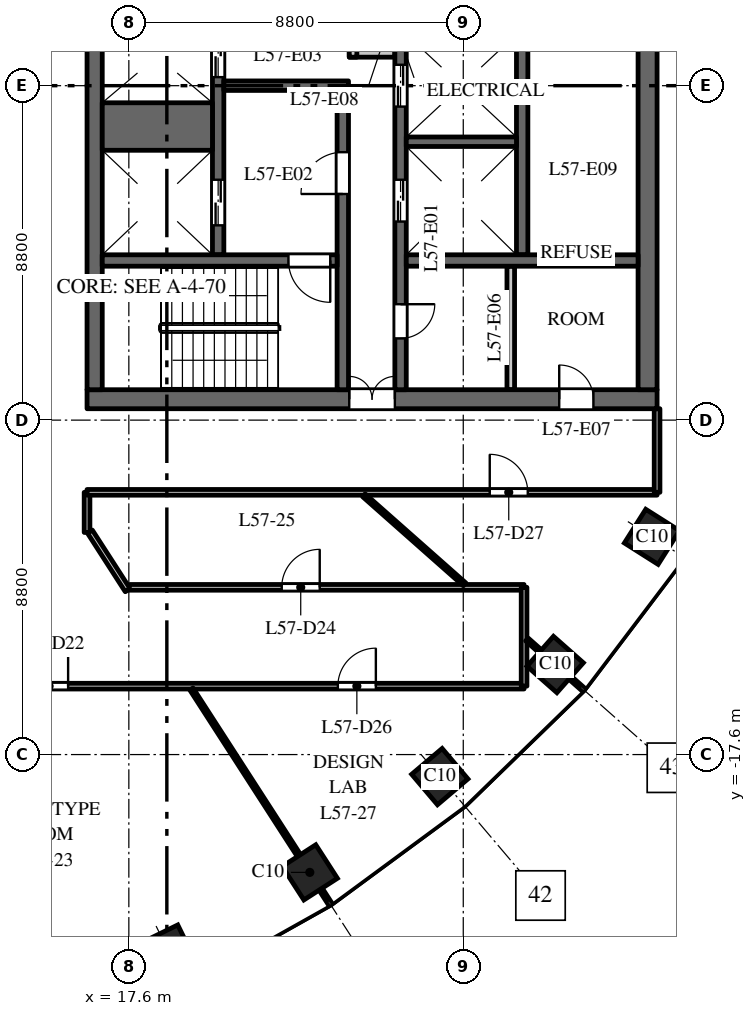
"""IFC4 building model, lengths in metres.
Left out: names, types, materials, properties, quantities, classifications, styles, units other than length and angle.
Written with IfcOpenShell. Run it as: python <this file> out.ifc"""

import sys

from ifc_helpers import new_model, si_unit, direction, frame, frame_2d, origin, origin_2d, place, context, subcontext, project, spatial, rectangle, extrude, element, fill, save


model = new_model("IFC4")
c1 = context("Model", 3, precision=1e-05, world=origin(), true_north=direction((0.0, 1.0)))
c2 = subcontext(c1, "Body", "Model", "MODEL_VIEW")
j1 = project(units=[si_unit("LENGTHUNIT", "METRE"), si_unit("PLANEANGLEUNIT", "RADIAN")], contexts=[c1])
p1 = place(None, origin())
s1 = spatial("IfcSite", under=j1, at=p1, CompositionType="ELEMENT")
p2 = place(p1, origin())
s2 = spatial("IfcBuilding", under=s1, at=p2, CompositionType="ELEMENT")
p3 = place(p2, frame((0.0, 0.0, 269.5)))
s3 = spatial("IfcBuildingStorey", under=s2, at=p3, CompositionType="ELEMENT", Elevation=269.5)
for number, where, z_axis, x_axis in (
    (1, (18.646, -22.785, 0.0), (0.0, 0.0, 1.0), (0.898, 0.439, 0.0)),
    (2, (22.362, -20.7, 0.0), (0.0, 0.0, 1.0), (0.84, 0.542, 0.0)),
    (3, (25.783, -18.18, 0.0), (0.0, 0.0, 1.0), (0.763, 0.646, 0.0)),
    (4, (28.819, -15.23, 0.0), (0.0, 0.0, 1.0), (0.663, 0.749, 0.0)),
    (5, (31.365, -11.871, 0.0), (0.0, 0.0, 1.0), (0.535, 0.845, 0.0)),
):
    element("IfcColumn", number, at=place(p3, frame(where, z_axis=z_axis, x_axis=x_axis)), inside=s3, PredefinedType="COLUMN", context=c2, shape_type="SweptSolid", body=[
        extrude(rectangle(XDim=1.05, YDim=1.05, at=origin_2d()), origin(), (0.0, 0.0, 1.0), 4.0),
    ])
p4 = place(p3, frame((16.5, -8.25, 0.0), z_axis=(0.0, 0.0, 1.0), x_axis=(1.0, 0.0, 0.0)))
e6 = element("IfcWall", 6, at=p4, inside=s3, PredefinedType="SHEAR", context=c2, shape_type="SweptSolid", body=[
    extrude(rectangle(XDim=15.0, YDim=0.5, at=frame_2d((7.5, 0.0))), origin(), (0.0, 0.0, 1.0), 3.7),
])
p5 = place(p4, frame((6.9, 0.0, 0.0)))
e7 = element("IfcOpeningElement", 7, at=p5, cuts=e6, PredefinedType="OPENING", context=c2, shape_type="SweptSolid", body=[
    extrude(rectangle(XDim=1.2, YDim=2.1, at=frame_2d((0.6, 1.05))), frame((0.0, 0.26, 0.0), z_axis=(0.0, -1.0, 0.0), x_axis=(1.0, 0.0, 0.0)), (0.0, 0.0, 1.0), 0.52),
])
p6 = place(p4, frame((12.425, 0.0, 0.0)))
e8 = element("IfcOpeningElement", 8, at=p6, cuts=e6, PredefinedType="OPENING", context=c2, shape_type="SweptSolid", body=[
    extrude(rectangle(XDim=0.9, YDim=2.1, at=frame_2d((0.45, 1.05))), frame((0.0, 0.26, 0.0), z_axis=(0.0, -1.0, 0.0), x_axis=(1.0, 0.0, 0.0)), (0.0, 0.0, 1.0), 0.52),
])
p7 = place(p3, frame((27.95, -4.45, 0.0), z_axis=(0.0, 0.0, 1.0), x_axis=(0.0, 1.0, 0.0)))
e9 = element("IfcWall", 9, at=p7, inside=s3, PredefinedType="SHEAR", context=c2, shape_type="SweptSolid", body=[
    extrude(rectangle(XDim=8.9, YDim=0.3, at=frame_2d((4.45, 0.0))), origin(), (0.0, 0.0, 1.0), 3.7),
])
p8 = place(p3, frame((19.95, -4.45, 0.0), z_axis=(0.0, 0.0, 1.0), x_axis=(0.0, 1.0, 0.0)))
e10 = element("IfcWall", 10, at=p8, inside=s3, PredefinedType="SHEAR", context=c2, shape_type="SweptSolid", body=[
    extrude(rectangle(XDim=8.9, YDim=0.3, at=frame_2d((4.45, 0.0))), origin(), (0.0, 0.0, 1.0), 3.7),
])
p9 = place(p8, frame((0.775, 0.0, 0.0)))
e11 = element("IfcOpeningElement", 11, at=p9, cuts=e10, PredefinedType="OPENING", context=c2, shape_type="SweptSolid", body=[
    extrude(rectangle(XDim=1.2, YDim=2.1, at=frame_2d((0.6, 1.05))), frame((0.0, 0.16, 0.0), z_axis=(0.0, -1.0, 0.0), x_axis=(1.0, 0.0, 0.0)), (0.0, 0.0, 1.0), 0.32),
])
p10 = place(p8, frame((4.675, 0.0, 0.0)))
e12 = element("IfcOpeningElement", 12, at=p10, cuts=e10, PredefinedType="OPENING", context=c2, shape_type="SweptSolid", body=[
    extrude(rectangle(XDim=1.1, YDim=2.1, at=frame_2d((0.55, 1.05))), frame((0.0, 0.16, 0.0), z_axis=(0.0, -1.0, 0.0), x_axis=(1.0, 0.0, 0.0)), (0.0, 0.0, 1.0), 0.32),
])
p11 = place(p8, frame((7.25, 0.0, 0.0)))
e13 = element("IfcOpeningElement", 13, at=p11, cuts=e10, PredefinedType="OPENING", context=c2, shape_type="SweptSolid", body=[
    extrude(rectangle(XDim=1.1, YDim=2.1, at=frame_2d((0.55, 1.05))), frame((0.0, 0.16, 0.0), z_axis=(0.0, -1.0, 0.0), x_axis=(1.0, 0.0, 0.0)), (0.0, 0.0, 1.0), 0.32),
])
p12 = place(p3, frame((24.75, -8.0, 0.0), z_axis=(0.0, 0.0, 1.0), x_axis=(0.0, 1.0, 0.0)))
e14 = element("IfcWall", 14, at=p12, inside=s3, PredefinedType="SHEAR", context=c2, shape_type="SweptSolid", body=[
    extrude(rectangle(XDim=16.0, YDim=0.3, at=frame_2d((8.0, 0.0))), origin(), (0.0, 0.0, 1.0), 3.7),
])
p13 = place(p12, frame((4.425, 0.0, 0.0)))
e15 = element("IfcOpeningElement", 15, at=p13, cuts=e14, PredefinedType="OPENING", context=c2, shape_type="SweptSolid", body=[
    extrude(rectangle(XDim=1.1, YDim=2.1, at=frame_2d((0.55, 1.05))), frame((0.0, 0.16, 0.0), z_axis=(0.0, -1.0, 0.0), x_axis=(1.0, 0.0, 0.0)), (0.0, 0.0, 1.0), 0.32),
])
p14 = place(p12, frame((7.45, 0.0, 0.0)))
e16 = element("IfcOpeningElement", 16, at=p14, cuts=e14, PredefinedType="OPENING", context=c2, shape_type="SweptSolid", body=[
    extrude(rectangle(XDim=1.1, YDim=2.1, at=frame_2d((0.55, 1.05))), frame((0.0, 0.16, 0.0), z_axis=(0.0, -1.0, 0.0), x_axis=(1.0, 0.0, 0.0)), (0.0, 0.0, 1.0), 0.32),
])
p15 = place(p12, frame((10.475, 0.0, 0.0)))
e17 = element("IfcOpeningElement", 17, at=p15, cuts=e14, PredefinedType="OPENING", context=c2, shape_type="SweptSolid", body=[
    extrude(rectangle(XDim=1.1, YDim=2.1, at=frame_2d((0.55, 1.05))), frame((0.0, 0.16, 0.0), z_axis=(0.0, -1.0, 0.0), x_axis=(1.0, 0.0, 0.0)), (0.0, 0.0, 1.0), 0.32),
])
p16 = place(p12, frame((13.75, 0.0, 0.0)))
e18 = element("IfcOpeningElement", 18, at=p16, cuts=e14, PredefinedType="OPENING", context=c2, shape_type="SweptSolid", body=[
    extrude(rectangle(XDim=0.9, YDim=2.1, at=frame_2d((0.45, 1.05))), frame((0.0, 0.16, 0.0), z_axis=(0.0, -1.0, 0.0), x_axis=(1.0, 0.0, 0.0)), (0.0, 0.0, 1.0), 0.32),
])
p17 = place(p12, frame((1.35, 0.0, 0.0)))
e19 = element("IfcOpeningElement", 19, at=p17, cuts=e14, PredefinedType="OPENING", context=c2, shape_type="SweptSolid", body=[
    extrude(rectangle(XDim=0.9, YDim=2.1, at=frame_2d((0.45, 1.05))), frame((0.0, 0.16, 0.0), z_axis=(0.0, -1.0, 0.0), x_axis=(1.0, 0.0, 0.0)), (0.0, 0.0, 1.0), 0.32),
])
p18 = place(p3, frame((20.1, 0.0, 0.0), z_axis=(0.0, 0.0, 1.0), x_axis=(1.0, 0.0, 0.0)))
e20 = element("IfcWall", 20, at=p18, inside=s3, PredefinedType="SHEAR", context=c2, shape_type="SweptSolid", body=[
    extrude(rectangle(XDim=3.28, YDim=0.25, at=frame_2d((1.64, 0.0))), origin(), (0.0, 0.0, 1.0), 3.7),
])
p19 = place(p3, frame((16.7, -8.0, 0.0), z_axis=(0.0, 0.0, 1.0), x_axis=(0.0, 1.0, 0.0)))
e21 = element("IfcWall", 21, at=p19, inside=s3, PredefinedType="SHEAR", context=c2, shape_type="SweptSolid", body=[
    extrude(rectangle(XDim=16.0, YDim=0.4, at=frame_2d((8.0, 0.0))), origin(), (0.0, 0.0, 1.0), 3.7),
])
p20 = place(p3, frame((23.4, 0.85, 0.0), z_axis=(0.0, 0.0, 1.0), x_axis=(1.0, 0.0, 0.0)))
e22 = element("IfcWall", 22, at=p20, inside=s3, PredefinedType="PARTITIONING", context=c2, shape_type="SweptSolid", body=[
    extrude(rectangle(XDim=1.2, YDim=0.2, at=frame_2d((0.6, 0.0))), origin(), (0.0, 0.0, 1.0), 3.7),
])
p21 = place(p3, frame((23.5, 0.75, 0.0), z_axis=(0.0, 0.0, 1.0), x_axis=(0.0, 1.0, 0.0)))
e23 = element("IfcWall", 23, at=p21, inside=s3, PredefinedType="PARTITIONING", context=c2, shape_type="SweptSolid", body=[
    extrude(rectangle(XDim=1.6, YDim=0.2, at=frame_2d((0.8, 0.0))), origin(), (0.0, 0.0, 1.0), 3.7),
])
p22 = place(p21, frame((0.25, 0.0, 0.0)))
e24 = element("IfcOpeningElement", 24, at=p22, cuts=e23, PredefinedType="OPENING", context=c2, shape_type="SweptSolid", body=[
    extrude(rectangle(XDim=0.9, YDim=2.1, at=frame_2d((0.45, 1.05))), frame((0.0, 0.11, 0.0), z_axis=(0.0, -1.0, 0.0), x_axis=(1.0, 0.0, 0.0)), (0.0, 0.0, 1.0), 0.22),
])
p23 = place(p3, frame((31.25, -8.0, 0.0), z_axis=(0.0, 0.0, 1.0), x_axis=(0.0, 1.0, 0.0)))
e25 = element("IfcWall", 25, at=p23, inside=s3, PredefinedType="SHEAR", context=c2, shape_type="SweptSolid", body=[
    extrude(rectangle(XDim=16.0, YDim=0.5, at=frame_2d((8.0, 0.0))), origin(), (0.0, 0.0, 1.0), 3.7),
])
p24 = place(p3, frame((27.65, -8.0, 0.0), z_axis=(0.0, 0.0, 1.0), x_axis=(0.0, 1.0, 0.0)))
e26 = element("IfcWall", 26, at=p24, inside=s3, PredefinedType="PARTITIONING", context=c2, shape_type="SweptSolid", body=[
    extrude(rectangle(XDim=3.25, YDim=0.2, at=frame_2d((1.625, 0.0))), origin(), (0.0, 0.0, 1.0), 3.7),
])
p25 = place(p3, frame((24.9, -4.6, 0.0), z_axis=(0.0, 0.0, 1.0), x_axis=(1.0, 0.0, 0.0)))
e27 = element("IfcWall", 27, at=p25, inside=s3, PredefinedType="SHEAR", context=c2, shape_type="SweptSolid", body=[
    extrude(rectangle(XDim=6.1, YDim=0.3, at=frame_2d((3.05, 0.0))), origin(), (0.0, 0.0, 1.0), 3.7),
])
p26 = place(p3, frame((16.9, -1.075, 0.0), z_axis=(0.0, 0.0, 1.0), x_axis=(1.0, 0.0, 0.0)))
e28 = element("IfcWall", 28, at=p26, inside=s3, PredefinedType="SHEAR", context=c2, shape_type="SweptSolid", body=[
    extrude(rectangle(XDim=2.9, YDim=1.25, at=frame_2d((1.45, 0.0))), origin(), (0.0, 0.0, 1.0), 3.7),
])
p27 = place(p3, frame((24.9, -1.475, 0.0), z_axis=(0.0, 0.0, 1.0), x_axis=(1.0, 0.0, 0.0)))
e29 = element("IfcWall", 29, at=p27, inside=s3, PredefinedType="SHEAR", context=c2, shape_type="SweptSolid", body=[
    extrude(rectangle(XDim=2.9, YDim=0.25, at=frame_2d((1.45, 0.0))), origin(), (0.0, 0.0, 1.0), 3.7),
])
p28 = place(p3, frame((23.23, -8.0, 0.0), z_axis=(0.0, 0.0, 1.0), x_axis=(0.0, 1.0, 0.0)))
e30 = element("IfcWall", 30, at=p28, inside=s3, PredefinedType="SHEAR", context=c2, shape_type="SweptSolid", body=[
    extrude(rectangle(XDim=7.875, YDim=0.3, at=frame_2d((3.938, 0.0))), origin(), (0.0, 0.0, 1.0), 3.7),
])
p29 = place(p28, frame((5.15, 0.0, 0.0)))
e31 = element("IfcOpeningElement", 31, at=p29, cuts=e30, PredefinedType="OPENING", context=c2, shape_type="SweptSolid", body=[
    extrude(rectangle(XDim=1.1, YDim=2.1, at=frame_2d((0.55, 1.05))), frame((0.0, 0.16, 0.0), z_axis=(0.0, -1.0, 0.0), x_axis=(1.0, 0.0, 0.0)), (0.0, 0.0, 1.0), 0.32),
])
p30 = place(p3, frame((16.9, -4.6, 0.0), z_axis=(0.0, 0.0, 1.0), x_axis=(1.0, 0.0, 0.0)))
e32 = element("IfcWall", 32, at=p30, inside=s3, PredefinedType="SHEAR", context=c2, shape_type="SweptSolid", body=[
    extrude(rectangle(XDim=6.18, YDim=0.3, at=frame_2d((3.09, 0.0))), origin(), (0.0, 0.0, 1.0), 3.7),
])
p31 = place(p30, frame((4.9, 0.0, 0.0)))
e33 = element("IfcOpeningElement", 33, at=p31, cuts=e32, PredefinedType="OPENING", context=c2, shape_type="SweptSolid", body=[
    extrude(rectangle(XDim=1.1, YDim=2.1, at=frame_2d((0.55, 1.05))), frame((0.0, 0.16, 0.0), z_axis=(0.0, -1.0, 0.0), x_axis=(1.0, 0.0, 0.0)), (0.0, 0.0, 1.0), 0.32),
])
p32 = place(p3, frame((11.614, -15.8, 0.0), z_axis=(0.0, 0.0, 1.0), x_axis=(1.0, 0.0, 0.0)))
e34 = element("IfcWall", 34, at=p32, inside=s3, PredefinedType="PARTITIONING", context=c2, shape_type="SweptSolid", body=[
    extrude(rectangle(XDim=16.386, YDim=0.15, at=frame_2d((8.193, 0.0))), origin(), (0.0, 0.0, 1.0), 3.0),
])
p33 = place(p32, frame((3.388, 0.0, 0.0)))
e35 = element("IfcOpeningElement", 35, at=p33, cuts=e34, PredefinedType="OPENING", context=c2, shape_type="SweptSolid", body=[
    extrude(rectangle(XDim=1.0, YDim=2.1, at=frame_2d((0.5, 1.05))), frame((0.0, 0.085, 0.0), z_axis=(0.0, -1.0, 0.0), x_axis=(1.0, 0.0, 0.0)), (0.0, 0.0, 1.0), 0.17),
])
p34 = place(p32, frame((11.486, 0.0, 0.0)))
e36 = element("IfcOpeningElement", 36, at=p34, cuts=e34, PredefinedType="OPENING", context=c2, shape_type="SweptSolid", body=[
    extrude(rectangle(XDim=1.0, YDim=2.1, at=frame_2d((0.5, 1.05))), frame((0.0, 0.085, 0.0), z_axis=(0.0, -1.0, 0.0), x_axis=(1.0, 0.0, 0.0)), (0.0, 0.0, 1.0), 0.17),
])
p35 = place(p3, frame((16.5, -11.755, 0.0), z_axis=(0.0, 0.0, 1.0), x_axis=(0.0, 1.0, 0.0)))
e37 = element("IfcWall", 37, at=p35, inside=s3, PredefinedType="PARTITIONING", context=c2, shape_type="SweptSolid", body=[
    extrude(rectangle(XDim=1.055, YDim=0.15, at=frame_2d((0.527, 0.0))), origin(), (0.0, 0.0, 1.0), 3.7),
])
p36 = place(p3, frame((16.575, -11.733, 0.0), z_axis=(0.0, 0.0, 1.0), x_axis=(0.541860116324, -0.840468687304, 0.0)))
e38 = element("IfcWall", 38, at=p36, inside=s3, PredefinedType="PARTITIONING", context=c2, shape_type="SweptSolid", body=[
    extrude(rectangle(XDim=1.835, YDim=0.15, at=frame_2d((0.917, 0.0))), origin(), (0.0, 0.0, 1.0), 3.7),
])
p37 = place(p3, frame((16.5, -10.7, 0.0), z_axis=(0.0, 0.0, 1.0), x_axis=(1.0, 0.0, 0.0)))
e39 = element("IfcWall", 39, at=p37, inside=s3, PredefinedType="PARTITIONING", context=c2, shape_type="SweptSolid", body=[
    extrude(rectangle(XDim=15.0, YDim=0.15, at=frame_2d((7.5, 0.0))), origin(), (0.0, 0.0, 1.0), 2.75),
])
p38 = place(p37, frame((10.597, 0.0, 0.0)))
e40 = element("IfcOpeningElement", 40, at=p38, cuts=e39, PredefinedType="OPENING", context=c2, shape_type="SweptSolid", body=[
    extrude(rectangle(XDim=1.0, YDim=2.1, at=frame_2d((0.5, 1.05))), frame((0.0, 0.085, 0.0), z_axis=(0.0, -1.0, 0.0), x_axis=(1.0, 0.0, 0.0)), (0.0, 0.0, 1.0), 0.17),
])
p39 = place(p3, frame((17.61, -13.2, 0.0), z_axis=(0.0, 0.0, 1.0), x_axis=(1.0, 0.0, 0.0)))
e41 = element("IfcWall", 41, at=p39, inside=s3, PredefinedType="PARTITIONING", context=c2, shape_type="SweptSolid", body=[
    extrude(rectangle(XDim=10.39, YDim=0.15, at=frame_2d((5.195, 0.0))), origin(), (0.0, 0.0, 1.0), 2.75),
])
p40 = place(p39, frame((4.013, 0.0, 0.0)))
e42 = element("IfcOpeningElement", 42, at=p40, cuts=e41, PredefinedType="OPENING", context=c2, shape_type="SweptSolid", body=[
    extrude(rectangle(XDim=1.0, YDim=2.1, at=frame_2d((0.5, 1.05))), frame((0.0, 0.085, 0.0), z_axis=(0.0, -1.0, 0.0), x_axis=(1.0, 0.0, 0.0)), (0.0, 0.0, 1.0), 0.17),
])
p41 = place(p3, frame((19.248, -15.875, 0.0), z_axis=(0.0, 0.0, 1.0), x_axis=(0.542216737844, -0.840238662049, 0.0)))
e43 = element("IfcWall", 43, at=p41, inside=s3, PredefinedType="PARTITIONING", context=c2, shape_type="SweptSolid", body=[
    extrude(rectangle(XDim=6.744, YDim=0.1, at=frame_2d((3.372, 0.0))), origin(), (0.0, 0.0, 1.0), 3.7),
])
p42 = place(p3, frame((23.785, -10.778, 0.0), z_axis=(0.0, 0.0, 1.0), x_axis=(0.749047927355, -0.662515813038, 0.0)))
e44 = element("IfcWall", 44, at=p42, inside=s3, PredefinedType="PARTITIONING", context=c2, shape_type="SweptSolid", body=[
    extrude(rectangle(XDim=3.538, YDim=0.1, at=frame_2d((1.769, 0.0))), origin(), (0.0, 0.0, 1.0), 3.7),
])
p43 = place(p3, frame((28.0, -15.8, 0.0), z_axis=(0.0, 0.0, 1.0), x_axis=(0.0, 1.0, 0.0)))
e45 = element("IfcWall", 45, at=p43, inside=s3, PredefinedType="PARTITIONING", context=c2, shape_type="SweptSolid", body=[
    extrude(rectangle(XDim=2.6, YDim=0.15, at=frame_2d((1.3, 0.0))), origin(), (0.0, 0.0, 1.0), 2.75),
])
p44 = place(p3, frame((28.075, -14.572, 0.0), z_axis=(0.0, 0.0, 1.0), x_axis=(0.748683588402, -0.662927510711, 0.0)))
e46 = element("IfcWall", 46, at=p44, inside=s3, PredefinedType="PARTITIONING", context=c2, shape_type="SweptSolid", body=[
    extrude(rectangle(XDim=1.996, YDim=0.1, at=frame_2d((0.998, 0.0))), origin(), (0.0, 0.0, 1.0), 2.75),
])
p45 = place(p3, frame((31.5, -10.7, 0.0), z_axis=(0.0, 0.0, 1.0), x_axis=(0.0, 1.0, 0.0)))
e47 = element("IfcWall", 47, at=p45, inside=s3, PredefinedType="PARTITIONING", context=c2, shape_type="SweptSolid", body=[
    extrude(rectangle(XDim=2.2, YDim=0.15, at=frame_2d((1.1, 0.0))), origin(), (0.0, 0.0, 1.0), 3.0),
])
p46 = place(p9, origin())
e48 = element("IfcDoor", 48, at=p46, inside=s3, OperationType="DOUBLE_DOOR_SLIDING", PredefinedType="DOOR", context=c2, shape_type="SweptSolid", body=[
    extrude(rectangle(XDim=1.2, YDim=2.1, at=frame_2d((0.6, 1.05))), frame((0.0, 0.025, 0.0), z_axis=(0.0, -1.0, 0.0), x_axis=(1.0, 0.0, 0.0)), (0.0, 0.0, 1.0), 0.05),
])
fill(e11, e48)
p47 = place(p10, origin())
e49 = element("IfcDoor", 49, at=p47, inside=s3, OperationType="DOUBLE_DOOR_SLIDING", PredefinedType="DOOR", context=c2, shape_type="SweptSolid", body=[
    extrude(rectangle(XDim=1.1, YDim=2.1, at=frame_2d((0.55, 1.05))), frame((0.0, 0.025, 0.0), z_axis=(0.0, -1.0, 0.0), x_axis=(1.0, 0.0, 0.0)), (0.0, 0.0, 1.0), 0.05),
])
fill(e12, e49)
p48 = place(p13, origin())
e50 = element("IfcDoor", 50, at=p48, inside=s3, OperationType="DOUBLE_DOOR_SLIDING", PredefinedType="DOOR", context=c2, shape_type="SweptSolid", body=[
    extrude(rectangle(XDim=1.1, YDim=2.1, at=frame_2d((0.55, 1.05))), frame((0.0, 0.025, 0.0), z_axis=(0.0, -1.0, 0.0), x_axis=(1.0, 0.0, 0.0)), (0.0, 0.0, 1.0), 0.05),
])
fill(e15, e50)
p49 = place(p14, origin())
e51 = element("IfcDoor", 51, at=p49, inside=s3, OperationType="DOUBLE_DOOR_SLIDING", PredefinedType="DOOR", context=c2, shape_type="SweptSolid", body=[
    extrude(rectangle(XDim=1.1, YDim=2.1, at=frame_2d((0.55, 1.05))), frame((0.0, 0.025, 0.0), z_axis=(0.0, -1.0, 0.0), x_axis=(1.0, 0.0, 0.0)), (0.0, 0.0, 1.0), 0.05),
])
fill(e16, e51)
p50 = place(p31, origin())
e52 = element("IfcDoor", 52, at=p50, inside=s3, OperationType="SINGLE_SWING_RIGHT", PredefinedType="DOOR", context=c2, shape_type="SweptSolid", body=[
    extrude(rectangle(XDim=1.1, YDim=2.1, at=frame_2d((0.55, 1.05))), frame((0.0, 0.025, 0.0), z_axis=(0.0, -1.0, 0.0), x_axis=(1.0, 0.0, 0.0)), (0.0, 0.0, 1.0), 0.05),
])
fill(e33, e52)
p51 = place(p29, origin())
e53 = element("IfcDoor", 53, at=p51, inside=s3, OperationType="SINGLE_SWING_RIGHT", PredefinedType="DOOR", context=c2, shape_type="SweptSolid", body=[
    extrude(rectangle(XDim=1.1, YDim=2.1, at=frame_2d((0.55, 1.05))), frame((0.0, 0.025, 0.0), z_axis=(0.0, -1.0, 0.0), x_axis=(1.0, 0.0, 0.0)), (0.0, 0.0, 1.0), 0.05),
])
fill(e31, e53)
p52 = place(p5, origin())
e54 = element("IfcDoor", 54, at=p52, inside=s3, OperationType="DOUBLE_DOOR_DOUBLE_SWING", PredefinedType="DOOR", context=c2, shape_type="SweptSolid", body=[
    extrude(rectangle(XDim=1.2, YDim=2.1, at=frame_2d((0.6, 1.05))), frame((0.0, 0.025, 0.0), z_axis=(0.0, -1.0, 0.0), x_axis=(1.0, 0.0, 0.0)), (0.0, 0.0, 1.0), 0.05),
])
fill(e7, e54)
p53 = place(p17, origin())
e55 = element("IfcDoor", 55, at=p53, inside=s3, OperationType="SINGLE_SWING_RIGHT", PredefinedType="DOOR", context=c2, shape_type="SweptSolid", body=[
    extrude(rectangle(XDim=0.9, YDim=2.1, at=frame_2d((0.45, 1.05))), frame((0.0, 0.025, 0.0), z_axis=(0.0, -1.0, 0.0), x_axis=(1.0, 0.0, 0.0)), (0.0, 0.0, 1.0), 0.05),
])
fill(e19, e55)
p54 = place(p6, origin())
e56 = element("IfcDoor", 56, at=p54, inside=s3, OperationType="SINGLE_SWING_RIGHT", PredefinedType="DOOR", context=c2, shape_type="SweptSolid", body=[
    extrude(rectangle(XDim=0.9, YDim=2.1, at=frame_2d((0.45, 1.05))), frame((0.0, 0.025, 0.0), z_axis=(0.0, -1.0, 0.0), x_axis=(1.0, 0.0, 0.0)), (0.0, 0.0, 1.0), 0.05),
])
fill(e8, e56)
p55 = place(p33, origin())
e57 = element("IfcDoor", 57, at=p55, inside=s3, OperationType="SINGLE_SWING_RIGHT", PredefinedType="DOOR", context=c2, shape_type="SweptSolid", body=[
    extrude(rectangle(XDim=1.0, YDim=2.1, at=frame_2d((0.5, 1.05))), frame((0.0, 0.025, 0.0), z_axis=(0.0, -1.0, 0.0), x_axis=(1.0, 0.0, 0.0)), (0.0, 0.0, 1.0), 0.05),
])
fill(e35, e57)
p56 = place(p40, origin())
e58 = element("IfcDoor", 58, at=p56, inside=s3, OperationType="SINGLE_SWING_RIGHT", PredefinedType="DOOR", context=c2, shape_type="SweptSolid", body=[
    extrude(rectangle(XDim=1.0, YDim=2.1, at=frame_2d((0.5, 1.05))), frame((0.0, 0.025, 0.0), z_axis=(0.0, -1.0, 0.0), x_axis=(1.0, 0.0, 0.0)), (0.0, 0.0, 1.0), 0.05),
])
fill(e42, e58)
p57 = place(p34, origin())
e59 = element("IfcDoor", 59, at=p57, inside=s3, OperationType="SINGLE_SWING_RIGHT", PredefinedType="DOOR", context=c2, shape_type="SweptSolid", body=[
    extrude(rectangle(XDim=1.0, YDim=2.1, at=frame_2d((0.5, 1.05))), frame((0.0, 0.025, 0.0), z_axis=(0.0, -1.0, 0.0), x_axis=(1.0, 0.0, 0.0)), (0.0, 0.0, 1.0), 0.05),
])
fill(e36, e59)
p58 = place(p38, origin())
e60 = element("IfcDoor", 60, at=p58, inside=s3, OperationType="SINGLE_SWING_LEFT", PredefinedType="DOOR", context=c2, shape_type="SweptSolid", body=[
    extrude(rectangle(XDim=1.0, YDim=2.1, at=frame_2d((0.5, 1.05))), frame((0.0, 0.025, 0.0), z_axis=(0.0, -1.0, 0.0), x_axis=(1.0, 0.0, 0.0)), (0.0, 0.0, 1.0), 0.05),
])
fill(e40, e60)
save(model, sys.argv[1])
